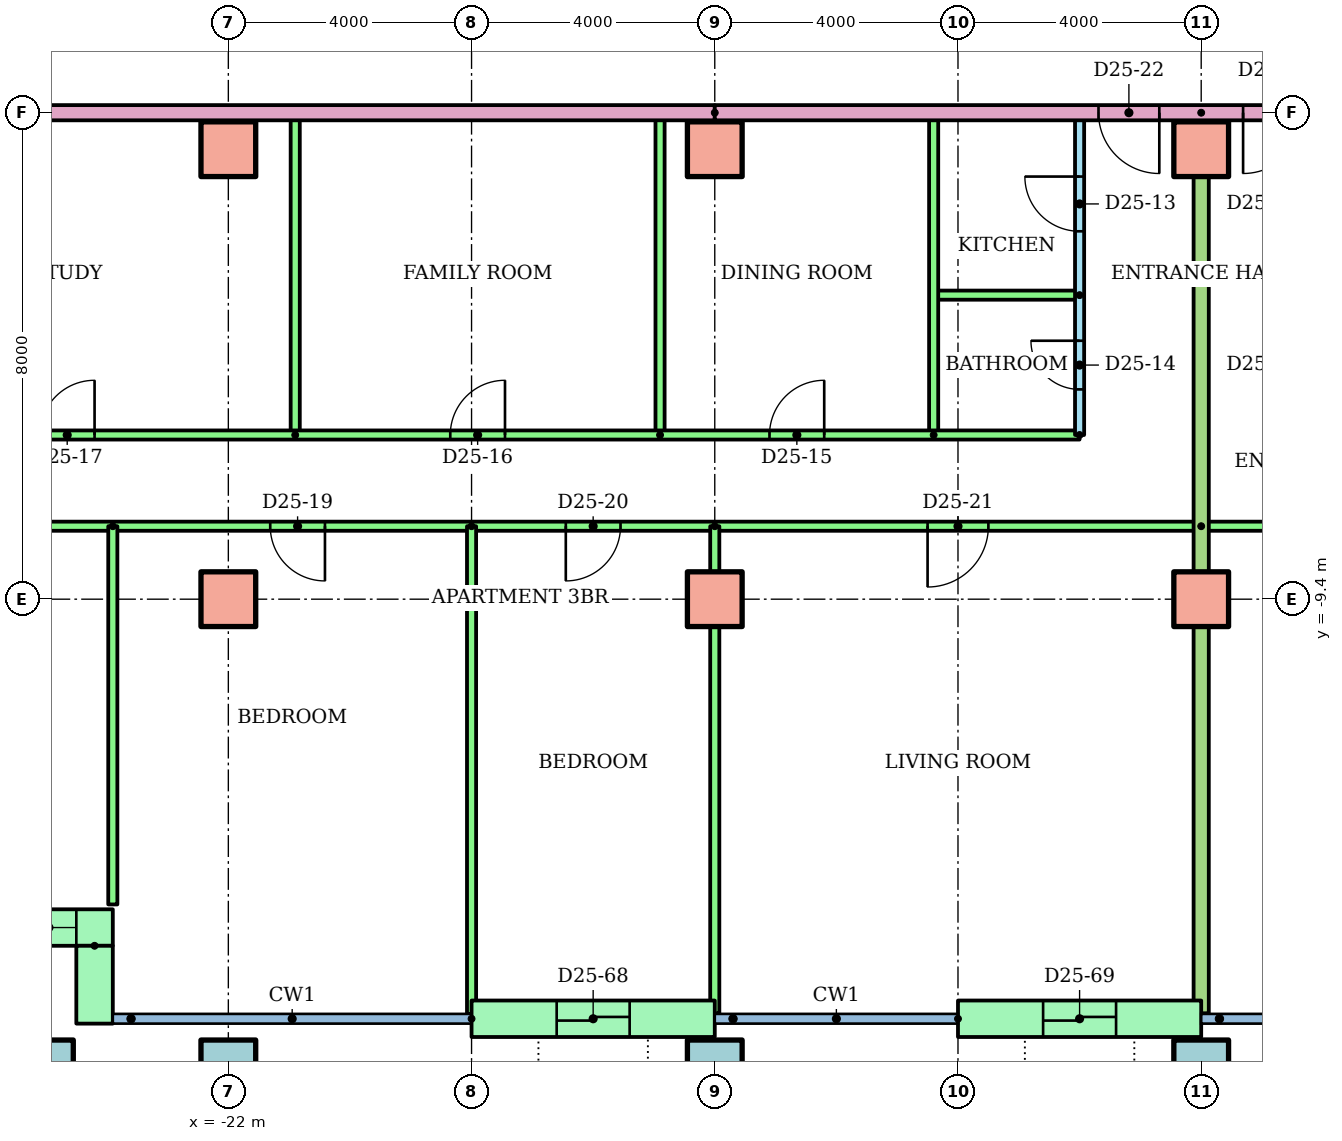
"""IFC4 building model, lengths in metres.
Left out: names, types, materials, properties, quantities, classifications, styles, units other than length and angle.
Written with IfcOpenShell. Run it as: python <this file> out.ifc"""

import sys

from ifc_helpers import new_model, si_unit, direction, frame, frame_2d, origin, origin_2d, place, context, subcontext, project, spatial, rectangle, hollow_rectangle, extrude, element, fill, save


model = new_model("IFC4")
c1 = context("Model", 3, precision=1e-05, world=origin(), true_north=direction((0.0, 1.0)))
c2 = subcontext(c1, "Body", "Model", "MODEL_VIEW")
j1 = project(units=[si_unit("LENGTHUNIT", "METRE"), si_unit("PLANEANGLEUNIT", "RADIAN")], contexts=[c1])
p1 = place(None, origin())
s1 = spatial("IfcSite", under=j1, at=p1, CompositionType="ELEMENT")
p2 = place(p1, origin())
s2 = spatial("IfcBuilding", under=s1, at=p2, CompositionType="ELEMENT")
p3 = place(p2, frame((0.0, 0.0, 96.7)))
s3 = spatial("IfcBuildingStorey", under=s2, at=p3, CompositionType="ELEMENT", Elevation=96.7)
for number, where in (
    (1, (-25.0, -17.1, 0.0)),
    (2, (-22.0, -17.1, 0.0)),
    (3, (-14.0, -17.1, 0.0)),
    (4, (-6.0, -17.1, 0.0)),
):
    element("IfcColumn", number, at=place(p3, frame(where)), inside=s3, PredefinedType="COLUMN", context=c2, shape_type="SweptSolid", body=[
        extrude(hollow_rectangle(XDim=0.9, YDim=0.9, WallThickness=0.045, at=origin_2d()), origin(), (0.0, 0.0, 1.0), 3.2),
    ])
for number, where in (
    (5, (-22.0, -9.4, 0.0)),
    (6, (-14.0, -9.4, 0.0)),
    (7, (-6.0, -9.4, 0.0)),
    (8, (-22.0, -2.0, 0.0)),
    (9, (-14.0, -2.0, 0.0)),
    (10, (-6.0, -2.0, 0.0)),
):
    element("IfcColumn", number, at=place(p3, frame(where)), inside=s3, PredefinedType="COLUMN", context=c2, shape_type="SweptSolid", body=[
        extrude(rectangle(XDim=0.9, YDim=0.9, at=origin_2d()), origin(), (0.0, 0.0, 1.0), 3.2),
    ])
p4 = place(p3, frame((-26.0, -14.8, 0.0)))
e11 = element("IfcWall", 11, at=p4, inside=s3, PredefinedType="STANDARD", context=c2, shape_type="SweptSolid", body=[
    extrude(rectangle(XDim=2.1, YDim=0.6, at=frame_2d((1.05, 0.0))), origin(), (0.0, 0.0, 1.0), 2.92),
])
p5 = place(p4, frame((0.6, 0.0, 0.9)))
e12 = element("IfcOpeningElement", 12, at=p5, cuts=e11, PredefinedType="OPENING", context=c2, shape_type="SweptSolid", body=[
    extrude(rectangle(XDim=0.9, YDim=1.5, at=frame_2d((0.45, 0.75))), frame((0.0, 0.31, 0.0), z_axis=(0.0, -1.0, 0.0), x_axis=(1.0, 0.0, 0.0)), (0.0, 0.0, 1.0), 0.62),
])
p6 = place(p3, frame((-24.2, -15.1, 0.0), z_axis=(0.0, 0.0, 1.0), x_axis=(0.0, -1.0, 0.0)))
e13 = element("IfcWall", 13, at=p6, inside=s3, PredefinedType="STANDARD", context=c2, shape_type="SweptSolid", body=[
    extrude(rectangle(XDim=1.28, YDim=0.6, at=frame_2d((0.64, 0.0))), origin(), (0.0, 0.0, 1.0), 2.92),
])
p7 = place(p3, frame((-18.0, -16.3, 0.0)))
e14 = element("IfcWall", 14, at=p7, inside=s3, PredefinedType="STANDARD", context=c2, shape_type="SweptSolid", body=[
    extrude(rectangle(XDim=4.0, YDim=0.6, at=frame_2d((2.0, 0.0))), origin(), (0.0, 0.0, 1.0), 2.92),
])
p8 = place(p7, frame((1.4, 0.0, 0.0)))
e15 = element("IfcOpeningElement", 15, at=p8, cuts=e14, PredefinedType="OPENING", context=c2, shape_type="SweptSolid", body=[
    extrude(rectangle(XDim=1.2, YDim=2.1, at=frame_2d((0.6, 1.05))), frame((0.0, 0.31, 0.0), z_axis=(0.0, -1.0, 0.0), x_axis=(1.0, 0.0, 0.0)), (0.0, 0.0, 1.0), 0.62),
])
p9 = place(p3, frame((-10.0, -16.3, 0.0)))
e16 = element("IfcWall", 16, at=p9, inside=s3, PredefinedType="STANDARD", context=c2, shape_type="SweptSolid", body=[
    extrude(rectangle(XDim=4.0, YDim=0.6, at=frame_2d((2.0, 0.0))), origin(), (0.0, 0.0, 1.0), 2.92),
])
p10 = place(p9, frame((1.4, 0.0, 0.0)))
e17 = element("IfcOpeningElement", 17, at=p10, cuts=e16, PredefinedType="OPENING", context=c2, shape_type="SweptSolid", body=[
    extrude(rectangle(XDim=1.2, YDim=2.1, at=frame_2d((0.6, 1.05))), frame((0.0, 0.31, 0.0), z_axis=(0.0, -1.0, 0.0), x_axis=(1.0, 0.0, 0.0)), (0.0, 0.0, 1.0), 0.62),
])
p11 = place(p3, frame((-8.0, -6.7, 0.0), z_axis=(0.0, 0.0, 1.0), x_axis=(0.0, 1.0, 0.0)))
e18 = element("IfcWall", 18, at=p11, inside=s3, PredefinedType="PARTITIONING", context=c2, shape_type="SweptSolid", body=[
    extrude(rectangle(XDim=5.3, YDim=0.15, at=frame_2d((2.65, 0.0))), origin(), (0.0, 0.0, 1.0), 2.4),
])
p12 = place(p11, frame((3.35, 0.0, 0.0)))
e19 = element("IfcOpeningElement", 19, at=p12, cuts=e18, PredefinedType="OPENING", context=c2, shape_type="SweptSolid", body=[
    extrude(rectangle(XDim=0.9, YDim=2.1, at=frame_2d((0.45, 1.05))), frame((0.0, 0.085, 0.0), z_axis=(0.0, -1.0, 0.0), x_axis=(1.0, 0.0, 0.0)), (0.0, 0.0, 1.0), 0.17),
])
p13 = place(p11, frame((0.75, 0.0, 0.0)))
e20 = element("IfcOpeningElement", 20, at=p13, cuts=e18, PredefinedType="OPENING", context=c2, shape_type="SweptSolid", body=[
    extrude(rectangle(XDim=0.8, YDim=2.1, at=frame_2d((0.4, 1.05))), frame((0.0, 0.085, 0.0), z_axis=(0.0, -1.0, 0.0), x_axis=(1.0, 0.0, 0.0)), (0.0, 0.0, 1.0), 0.17),
])
p14 = place(p3, frame((-8.0, -4.4, 0.0), z_axis=(0.0, 0.0, 1.0), x_axis=(-1.0, 0.0, 0.0)))
e21 = element("IfcWall", 21, at=p14, inside=s3, PredefinedType="PARTITIONING", context=c2, shape_type="SweptSolid", body=[
    extrude(rectangle(XDim=2.4, YDim=0.15, at=frame_2d((1.2, 0.0))), origin(), (0.0, 0.0, 1.0), 2.4),
])
for number, where, z_axis, x_axis in (
    (22, (-10.4, -6.7, 0.0), (0.0, 0.0, 1.0), (0.0, 1.0, 0.0)),
    (23, (-14.9, -6.7, 0.0), (0.0, 0.0, 1.0), (0.0, 1.0, 0.0)),
    (24, (-20.9, -6.7, 0.0), (0.0, 0.0, 1.0), (0.0, 1.0, 0.0)),
):
    element("IfcWall", number, at=place(p3, frame(where, z_axis=z_axis, x_axis=x_axis)), inside=s3, PredefinedType="PARTITIONING", context=c2, shape_type="SweptSolid", body=[
        extrude(rectangle(XDim=5.3, YDim=0.15, at=frame_2d((2.65, 0.0))), origin(), (0.0, 0.0, 1.0), 2.4),
    ])
p15 = place(p3, frame((-28.61, -6.7, 0.0)))
e25 = element("IfcWall", 25, at=p15, inside=s3, PredefinedType="PARTITIONING", context=c2, shape_type="SweptSolid", body=[
    extrude(rectangle(XDim=20.61, YDim=0.15, at=frame_2d((10.305, 0.0))), origin(), (0.0, 0.0, 1.0), 2.4),
])
p16 = place(p15, frame((15.51, 0.0, 0.0)))
e26 = element("IfcOpeningElement", 26, at=p16, cuts=e25, PredefinedType="OPENING", context=c2, shape_type="SweptSolid", body=[
    extrude(rectangle(XDim=0.9, YDim=2.1, at=frame_2d((0.45, 1.05))), frame((0.0, 0.085, 0.0), z_axis=(0.0, -1.0, 0.0), x_axis=(1.0, 0.0, 0.0)), (0.0, 0.0, 1.0), 0.17),
])
p17 = place(p15, frame((10.26, 0.0, 0.0)))
e27 = element("IfcOpeningElement", 27, at=p17, cuts=e25, PredefinedType="OPENING", context=c2, shape_type="SweptSolid", body=[
    extrude(rectangle(XDim=0.9, YDim=2.1, at=frame_2d((0.45, 1.05))), frame((0.0, 0.085, 0.0), z_axis=(0.0, -1.0, 0.0), x_axis=(1.0, 0.0, 0.0)), (0.0, 0.0, 1.0), 0.17),
])
p18 = place(p15, frame((3.51, 0.0, 0.0)))
e28 = element("IfcOpeningElement", 28, at=p18, cuts=e25, PredefinedType="OPENING", context=c2, shape_type="SweptSolid", body=[
    extrude(rectangle(XDim=0.9, YDim=2.1, at=frame_2d((0.45, 1.05))), frame((0.0, 0.085, 0.0), z_axis=(0.0, -1.0, 0.0), x_axis=(1.0, 0.0, 0.0)), (0.0, 0.0, 1.0), 0.17),
])
p19 = place(p3, frame((-6.0, -8.2, 0.0), z_axis=(0.0, 0.0, 1.0), x_axis=(-1.0, 0.0, 0.0)))
e29 = element("IfcWall", 29, at=p19, inside=s3, PredefinedType="PARTITIONING", context=c2, shape_type="SweptSolid", body=[
    extrude(rectangle(XDim=22.61, YDim=0.15, at=frame_2d((11.305, 0.0))), origin(), (0.0, 0.0, 1.0), 2.4),
])
p20 = place(p19, frame((19.7, 0.0, 0.0)))
e30 = element("IfcOpeningElement", 30, at=p20, cuts=e29, PredefinedType="OPENING", context=c2, shape_type="SweptSolid", body=[
    extrude(rectangle(XDim=0.9, YDim=2.1, at=frame_2d((0.45, 1.05))), frame((0.0, 0.085, 0.0), z_axis=(0.0, -1.0, 0.0), x_axis=(1.0, 0.0, 0.0)), (0.0, 0.0, 1.0), 0.17),
])
p21 = place(p19, frame((14.411, 0.0, 0.0)))
e31 = element("IfcOpeningElement", 31, at=p21, cuts=e29, PredefinedType="OPENING", context=c2, shape_type="SweptSolid", body=[
    extrude(rectangle(XDim=0.9, YDim=2.1, at=frame_2d((0.45, 1.05))), frame((0.0, 0.085, 0.0), z_axis=(0.0, -1.0, 0.0), x_axis=(1.0, 0.0, 0.0)), (0.0, 0.0, 1.0), 0.17),
])
p22 = place(p19, frame((9.55, 0.0, 0.0)))
e32 = element("IfcOpeningElement", 32, at=p22, cuts=e29, PredefinedType="OPENING", context=c2, shape_type="SweptSolid", body=[
    extrude(rectangle(XDim=0.9, YDim=2.1, at=frame_2d((0.45, 1.05))), frame((0.0, 0.085, 0.0), z_axis=(0.0, -1.0, 0.0), x_axis=(1.0, 0.0, 0.0)), (0.0, 0.0, 1.0), 0.17),
])
p23 = place(p19, frame((3.5, 0.0, 0.0)))
e33 = element("IfcOpeningElement", 33, at=p23, cuts=e29, PredefinedType="OPENING", context=c2, shape_type="SweptSolid", body=[
    extrude(rectangle(XDim=1.0, YDim=2.1, at=frame_2d((0.5, 1.05))), frame((0.0, 0.085, 0.0), z_axis=(0.0, -1.0, 0.0), x_axis=(1.0, 0.0, 0.0)), (0.0, 0.0, 1.0), 0.17),
])
p24 = place(p3, frame((-23.9, -8.2, 0.0), z_axis=(0.0, 0.0, 1.0), x_axis=(0.0, -1.0, 0.0)))
e34 = element("IfcWall", 34, at=p24, inside=s3, PredefinedType="PARTITIONING", context=c2, shape_type="SweptSolid", body=[
    extrude(rectangle(XDim=6.22, YDim=0.15, at=frame_2d((3.11, 0.0))), origin(), (0.0, 0.0, 1.0), 2.4),
])
p25 = place(p3, frame((-18.0, -8.2, 0.0), z_axis=(0.0, 0.0, 1.0), x_axis=(0.0, -1.0, 0.0)))
e35 = element("IfcWall", 35, at=p25, inside=s3, PredefinedType="PARTITIONING", context=c2, shape_type="SweptSolid", body=[
    extrude(rectangle(XDim=8.021, YDim=0.15, at=frame_2d((4.01, 0.0))), origin(), (0.0, 0.0, 1.0), 2.4),
])
p26 = place(p3, frame((-14.0, -8.2, 0.0), z_axis=(0.0, 0.0, 1.0), x_axis=(0.0, -1.0, 0.0)))
e36 = element("IfcWall", 36, at=p26, inside=s3, PredefinedType="PARTITIONING", context=c2, shape_type="SweptSolid", body=[
    extrude(rectangle(XDim=8.01, YDim=0.15, at=frame_2d((4.005, 0.0))), origin(), (0.0, 0.0, 1.0), 2.4),
])
p27 = place(p3, frame((18.0, -8.2, 0.0), z_axis=(0.0, 0.0, 1.0), x_axis=(-1.0, 0.0, 0.0)))
e37 = element("IfcWall", 37, at=p27, inside=s3, PredefinedType="PARTITIONING", context=c2, shape_type="SweptSolid", body=[
    extrude(rectangle(XDim=24.0, YDim=0.15, at=frame_2d((12.0, 0.0))), origin(), (0.0, 0.0, 1.0), 2.4),
])
p28 = place(p27, frame((19.5, 0.0, 0.0)))
e38 = element("IfcOpeningElement", 38, at=p28, cuts=e37, PredefinedType="OPENING", context=c2, shape_type="SweptSolid", body=[
    extrude(rectangle(XDim=1.0, YDim=2.1, at=frame_2d((0.5, 1.05))), frame((0.0, 0.085, 0.0), z_axis=(0.0, -1.0, 0.0), x_axis=(1.0, 0.0, 0.0)), (0.0, 0.0, 1.0), 0.17),
])
p29 = place(p27, frame((13.55, 0.0, 0.0)))
e39 = element("IfcOpeningElement", 39, at=p29, cuts=e37, PredefinedType="OPENING", context=c2, shape_type="SweptSolid", body=[
    extrude(rectangle(XDim=0.9, YDim=2.1, at=frame_2d((0.45, 1.05))), frame((0.0, 0.085, 0.0), z_axis=(0.0, -1.0, 0.0), x_axis=(1.0, 0.0, 0.0)), (0.0, 0.0, 1.0), 0.17),
])
p30 = place(p27, frame((9.55, 0.0, 0.0)))
e40 = element("IfcOpeningElement", 40, at=p30, cuts=e37, PredefinedType="OPENING", context=c2, shape_type="SweptSolid", body=[
    extrude(rectangle(XDim=0.9, YDim=2.1, at=frame_2d((0.45, 1.05))), frame((0.0, 0.085, 0.0), z_axis=(0.0, -1.0, 0.0), x_axis=(1.0, 0.0, 0.0)), (0.0, 0.0, 1.0), 0.17),
])
p31 = place(p27, frame((5.55, 0.0, 0.0)))
e41 = element("IfcOpeningElement", 41, at=p31, cuts=e37, PredefinedType="OPENING", context=c2, shape_type="SweptSolid", body=[
    extrude(rectangle(XDim=0.9, YDim=2.1, at=frame_2d((0.45, 1.05))), frame((0.0, 0.085, 0.0), z_axis=(0.0, -1.0, 0.0), x_axis=(1.0, 0.0, 0.0)), (0.0, 0.0, 1.0), 0.17),
])
p32 = place(p27, frame((1.55, 0.0, 0.0)))
e42 = element("IfcOpeningElement", 42, at=p32, cuts=e37, PredefinedType="OPENING", context=c2, shape_type="SweptSolid", body=[
    extrude(rectangle(XDim=0.9, YDim=2.1, at=frame_2d((0.45, 1.05))), frame((0.0, 0.085, 0.0), z_axis=(0.0, -1.0, 0.0), x_axis=(1.0, 0.0, 0.0)), (0.0, 0.0, 1.0), 0.17),
])
p33 = place(p3, frame((-6.0, -1.4, 0.0), z_axis=(0.0, 0.0, 1.0), x_axis=(0.0, -1.0, 0.0)))
e43 = element("IfcWall", 43, at=p33, inside=s3, PredefinedType="PARTITIONING", context=c2, shape_type="SweptSolid", body=[
    extrude(rectangle(XDim=14.81, YDim=0.25, at=frame_2d((7.405, 0.0))), origin(), (0.0, 0.0, 1.0), 2.4),
])
p34 = place(p3, frame((-14.0, -1.4, 0.0), z_axis=(0.0, 0.0, 1.0), x_axis=(-1.0, 0.0, 0.0)))
e44 = element("IfcWall", 44, at=p34, inside=s3, PredefinedType="PARTITIONING", context=c2, shape_type="SweptSolid", body=[
    extrude(rectangle(XDim=14.62, YDim=0.25, at=frame_2d((7.31, 0.0))), origin(), (0.0, 0.0, 1.0), 2.4),
])
p35 = place(p3, frame((14.0, -1.4, 0.0), z_axis=(0.0, 0.0, 1.0), x_axis=(-1.0, 0.0, 0.0)))
e45 = element("IfcWall", 45, at=p35, inside=s3, PredefinedType="PARTITIONING", context=c2, shape_type="SweptSolid", body=[
    extrude(rectangle(XDim=28.0, YDim=0.25, at=frame_2d((14.0, 0.0))), origin(), (0.0, 0.0, 1.0), 2.4),
])
p36 = place(p35, frame((20.689, 0.0, 0.0)))
e46 = element("IfcOpeningElement", 46, at=p36, cuts=e45, PredefinedType="OPENING", context=c2, shape_type="SweptSolid", body=[
    extrude(rectangle(XDim=1.0, YDim=2.1, at=frame_2d((0.5, 1.05))), frame((0.0, 0.135, 0.0), z_axis=(0.0, -1.0, 0.0), x_axis=(1.0, 0.0, 0.0)), (0.0, 0.0, 1.0), 0.27),
])
p37 = place(p35, frame((18.311, 0.0, 0.0)))
e47 = element("IfcOpeningElement", 47, at=p37, cuts=e45, PredefinedType="OPENING", context=c2, shape_type="SweptSolid", body=[
    extrude(rectangle(XDim=1.0, YDim=2.1, at=frame_2d((0.5, 1.05))), frame((0.0, 0.135, 0.0), z_axis=(0.0, -1.0, 0.0), x_axis=(1.0, 0.0, 0.0)), (0.0, 0.0, 1.0), 0.27),
])
p38 = place(p5, origin())
e48 = element("IfcWindow", 48, at=p38, inside=s3, PartitioningType="SINGLE_PANEL", PredefinedType="WINDOW", context=c2, shape_type="SweptSolid", body=[
    extrude(rectangle(XDim=0.9, YDim=1.5, at=frame_2d((0.45, 0.75))), frame((0.0, 0.03, 0.0), z_axis=(0.0, -1.0, 0.0), x_axis=(1.0, 0.0, 0.0)), (0.0, 0.0, 1.0), 0.06),
])
fill(e12, e48)
p39 = place(p12, origin())
e49 = element("IfcDoor", 49, at=p39, inside=s3, OperationType="SINGLE_SWING_RIGHT", PredefinedType="DOOR", context=c2, shape_type="SweptSolid", body=[
    extrude(rectangle(XDim=0.9, YDim=2.1, at=frame_2d((0.45, 1.05))), frame((0.0, 0.025, 0.0), z_axis=(0.0, -1.0, 0.0), x_axis=(1.0, 0.0, 0.0)), (0.0, 0.0, 1.0), 0.05),
])
fill(e19, e49)
p40 = place(p13, origin())
e50 = element("IfcDoor", 50, at=p40, inside=s3, OperationType="SINGLE_SWING_RIGHT", PredefinedType="DOOR", context=c2, shape_type="SweptSolid", body=[
    extrude(rectangle(XDim=0.8, YDim=2.1, at=frame_2d((0.4, 1.05))), frame((0.0, 0.025, 0.0), z_axis=(0.0, -1.0, 0.0), x_axis=(1.0, 0.0, 0.0)), (0.0, 0.0, 1.0), 0.05),
])
fill(e20, e50)
p41 = place(p16, origin())
e51 = element("IfcDoor", 51, at=p41, inside=s3, OperationType="SINGLE_SWING_RIGHT", PredefinedType="DOOR", context=c2, shape_type="SweptSolid", body=[
    extrude(rectangle(XDim=0.9, YDim=2.1, at=frame_2d((0.45, 1.05))), frame((0.0, 0.025, 0.0), z_axis=(0.0, -1.0, 0.0), x_axis=(1.0, 0.0, 0.0)), (0.0, 0.0, 1.0), 0.05),
])
fill(e26, e51)
p42 = place(p17, origin())
e52 = element("IfcDoor", 52, at=p42, inside=s3, OperationType="SINGLE_SWING_RIGHT", PredefinedType="DOOR", context=c2, shape_type="SweptSolid", body=[
    extrude(rectangle(XDim=0.9, YDim=2.1, at=frame_2d((0.45, 1.05))), frame((0.0, 0.025, 0.0), z_axis=(0.0, -1.0, 0.0), x_axis=(1.0, 0.0, 0.0)), (0.0, 0.0, 1.0), 0.05),
])
fill(e27, e52)
p43 = place(p18, origin())
e53 = element("IfcDoor", 53, at=p43, inside=s3, OperationType="SINGLE_SWING_RIGHT", PredefinedType="DOOR", context=c2, shape_type="SweptSolid", body=[
    extrude(rectangle(XDim=0.9, YDim=2.1, at=frame_2d((0.45, 1.05))), frame((0.0, 0.025, 0.0), z_axis=(0.0, -1.0, 0.0), x_axis=(1.0, 0.0, 0.0)), (0.0, 0.0, 1.0), 0.05),
])
fill(e28, e53)
p44 = place(p21, origin())
e54 = element("IfcDoor", 54, at=p44, inside=s3, OperationType="SINGLE_SWING_LEFT", PredefinedType="DOOR", context=c2, shape_type="SweptSolid", body=[
    extrude(rectangle(XDim=0.9, YDim=2.1, at=frame_2d((0.45, 1.05))), frame((0.0, 0.025, 0.0), z_axis=(0.0, -1.0, 0.0), x_axis=(1.0, 0.0, 0.0)), (0.0, 0.0, 1.0), 0.05),
])
fill(e31, e54)
p45 = place(p22, origin())
e55 = element("IfcDoor", 55, at=p45, inside=s3, OperationType="SINGLE_SWING_RIGHT", PredefinedType="DOOR", context=c2, shape_type="SweptSolid", body=[
    extrude(rectangle(XDim=0.9, YDim=2.1, at=frame_2d((0.45, 1.05))), frame((0.0, 0.025, 0.0), z_axis=(0.0, -1.0, 0.0), x_axis=(1.0, 0.0, 0.0)), (0.0, 0.0, 1.0), 0.05),
])
fill(e32, e55)
p46 = place(p23, origin())
e56 = element("IfcDoor", 56, at=p46, inside=s3, OperationType="SINGLE_SWING_RIGHT", PredefinedType="DOOR", context=c2, shape_type="SweptSolid", body=[
    extrude(rectangle(XDim=1.0, YDim=2.1, at=frame_2d((0.5, 1.05))), frame((0.0, 0.025, 0.0), z_axis=(0.0, -1.0, 0.0), x_axis=(1.0, 0.0, 0.0)), (0.0, 0.0, 1.0), 0.05),
])
fill(e33, e56)
p47 = place(p36, origin())
e57 = element("IfcDoor", 57, at=p47, inside=s3, OperationType="SINGLE_SWING_LEFT", PredefinedType="DOOR", context=c2, shape_type="SweptSolid", body=[
    extrude(rectangle(XDim=1.0, YDim=2.1, at=frame_2d((0.5, 1.05))), frame((0.0, 0.025, 0.0), z_axis=(0.0, -1.0, 0.0), x_axis=(1.0, 0.0, 0.0)), (0.0, 0.0, 1.0), 0.05),
])
fill(e46, e57)
p48 = place(p37, origin())
e58 = element("IfcDoor", 58, at=p48, inside=s3, OperationType="SINGLE_SWING_RIGHT", PredefinedType="DOOR", context=c2, shape_type="SweptSolid", body=[
    extrude(rectangle(XDim=1.0, YDim=2.1, at=frame_2d((0.5, 1.05))), frame((0.0, 0.025, 0.0), z_axis=(0.0, -1.0, 0.0), x_axis=(1.0, 0.0, 0.0)), (0.0, 0.0, 1.0), 0.05),
])
fill(e47, e58)
p49 = place(p8, origin())
e59 = element("IfcDoor", 59, at=p49, inside=s3, OperationType="SLIDING_TO_LEFT", PredefinedType="DOOR", context=c2, shape_type="SweptSolid", body=[
    extrude(rectangle(XDim=1.2, YDim=2.1, at=frame_2d((0.6, 1.05))), frame((0.0, 0.025, 0.0), z_axis=(0.0, -1.0, 0.0), x_axis=(1.0, 0.0, 0.0)), (0.0, 0.0, 1.0), 0.05),
])
fill(e15, e59)
p50 = place(p10, origin())
e60 = element("IfcDoor", 60, at=p50, inside=s3, OperationType="SLIDING_TO_LEFT", PredefinedType="DOOR", context=c2, shape_type="SweptSolid", body=[
    extrude(rectangle(XDim=1.2, YDim=2.1, at=frame_2d((0.6, 1.05))), frame((0.0, 0.025, 0.0), z_axis=(0.0, -1.0, 0.0), x_axis=(1.0, 0.0, 0.0)), (0.0, 0.0, 1.0), 0.05),
])
fill(e17, e60)
save(model, sys.argv[1])
